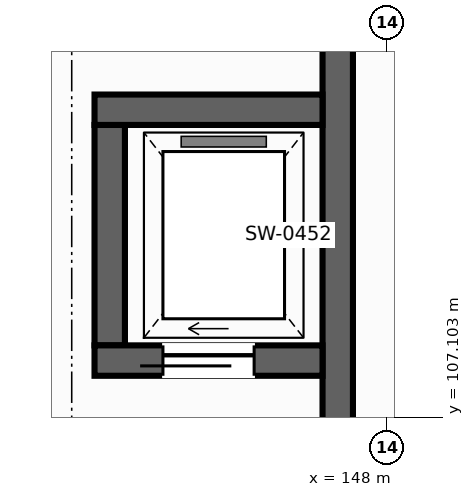
"""IFC4 building model, lengths in metres.
Left out: names, types, materials, properties, quantities, classifications, styles, units other than length and angle.
Written with IfcOpenShell. Run it as: python <this file> out.ifc"""

import sys

from ifc_helpers import new_model, si_unit, direction, frame, frame_2d, origin, place, context, subcontext, project, spatial, rectangle, extrude, element, fill, save


model = new_model("IFC4")
c1 = context("Model", 3, precision=1e-05, world=origin(), true_north=direction((0.0, 1.0)))
c2 = subcontext(c1, "Body", "Model", "MODEL_VIEW")
j1 = project(units=[si_unit("LENGTHUNIT", "METRE"), si_unit("PLANEANGLEUNIT", "RADIAN")], contexts=[c1])
p1 = place(None, origin())
s1 = spatial("IfcSite", under=j1, at=p1, CompositionType="ELEMENT")
p2 = place(p1, origin())
s2 = spatial("IfcBuilding", under=s1, at=p2, CompositionType="ELEMENT")
p3 = place(p2, origin())
s3 = spatial("IfcBuildingStorey", under=s2, at=p3, CompositionType="ELEMENT", Elevation=0.0)
p4 = place(p3, frame((147.35, 107.0, 0.0), z_axis=(0.0, 0.0, 1.0), x_axis=(0.0, 1.0, 0.0)))
e1 = element("IfcWall", 1, at=p4, inside=s3, PredefinedType="SHEAR", context=c2, shape_type="SweptSolid", body=[
    extrude(rectangle(XDim=5.0, YDim=0.4, at=frame_2d((2.5, 0.0))), origin(), (0.0, 0.0, 1.0), 4.225),
])
p5 = place(p3, frame((144.35, 108.05, 0.0), z_axis=(0.0, 0.0, 1.0), x_axis=(0.0, 1.0, 0.0)))
e2 = element("IfcWall", 2, at=p5, inside=s3, PredefinedType="SHEAR", context=c2, shape_type="SweptSolid", body=[
    extrude(rectangle(XDim=2.9, YDim=0.4, at=frame_2d((1.45, 0.0))), origin(), (0.0, 0.0, 1.0), 4.225),
])
p6 = place(p3, frame((144.15, 107.85, 0.0), z_axis=(0.0, 0.0, 1.0), x_axis=(1.0, 0.0, 0.0)))
e3 = element("IfcWall", 3, at=p6, inside=s3, PredefinedType="SHEAR", context=c2, shape_type="SweptSolid", body=[
    extrude(rectangle(XDim=3.0, YDim=0.4, at=frame_2d((1.5, 0.0))), origin(), (0.0, 0.0, 1.0), 4.225),
])
p7 = place(p6, frame((0.9, 0.0, 0.0)))
e4 = element("IfcOpeningElement", 4, at=p7, cuts=e3, PredefinedType="OPENING", context=c2, shape_type="SweptSolid", body=[
    extrude(rectangle(XDim=1.2, YDim=2.2, at=frame_2d((0.6, 1.1))), frame((0.0, 0.21, 0.0), z_axis=(0.0, -1.0, 0.0), x_axis=(1.0, 0.0, 0.0)), (0.0, 0.0, 1.0), 0.42),
])
p8 = place(p3, frame((144.15, 111.15, 0.0), z_axis=(0.0, 0.0, 1.0), x_axis=(1.0, 0.0, 0.0)))
e5 = element("IfcWall", 5, at=p8, inside=s3, PredefinedType="SHEAR", context=c2, shape_type="SweptSolid", body=[
    extrude(rectangle(XDim=3.0, YDim=0.4, at=frame_2d((1.5, 0.0))), origin(), (0.0, 0.0, 1.0), 4.225),
])
p9 = place(p7, origin())
e6 = element("IfcDoor", 6, at=p9, inside=s3, OperationType="SLIDING_TO_LEFT", PredefinedType="DOOR", context=c2, shape_type="SweptSolid", body=[
    extrude(rectangle(XDim=1.2, YDim=2.2, at=frame_2d((0.6, 1.1))), frame((0.0, 0.025, 0.0), z_axis=(0.0, -1.0, 0.0), x_axis=(1.0, 0.0, 0.0)), (0.0, 0.0, 1.0), 0.05),
])
fill(e4, e6)
save(model, sys.argv[1])
